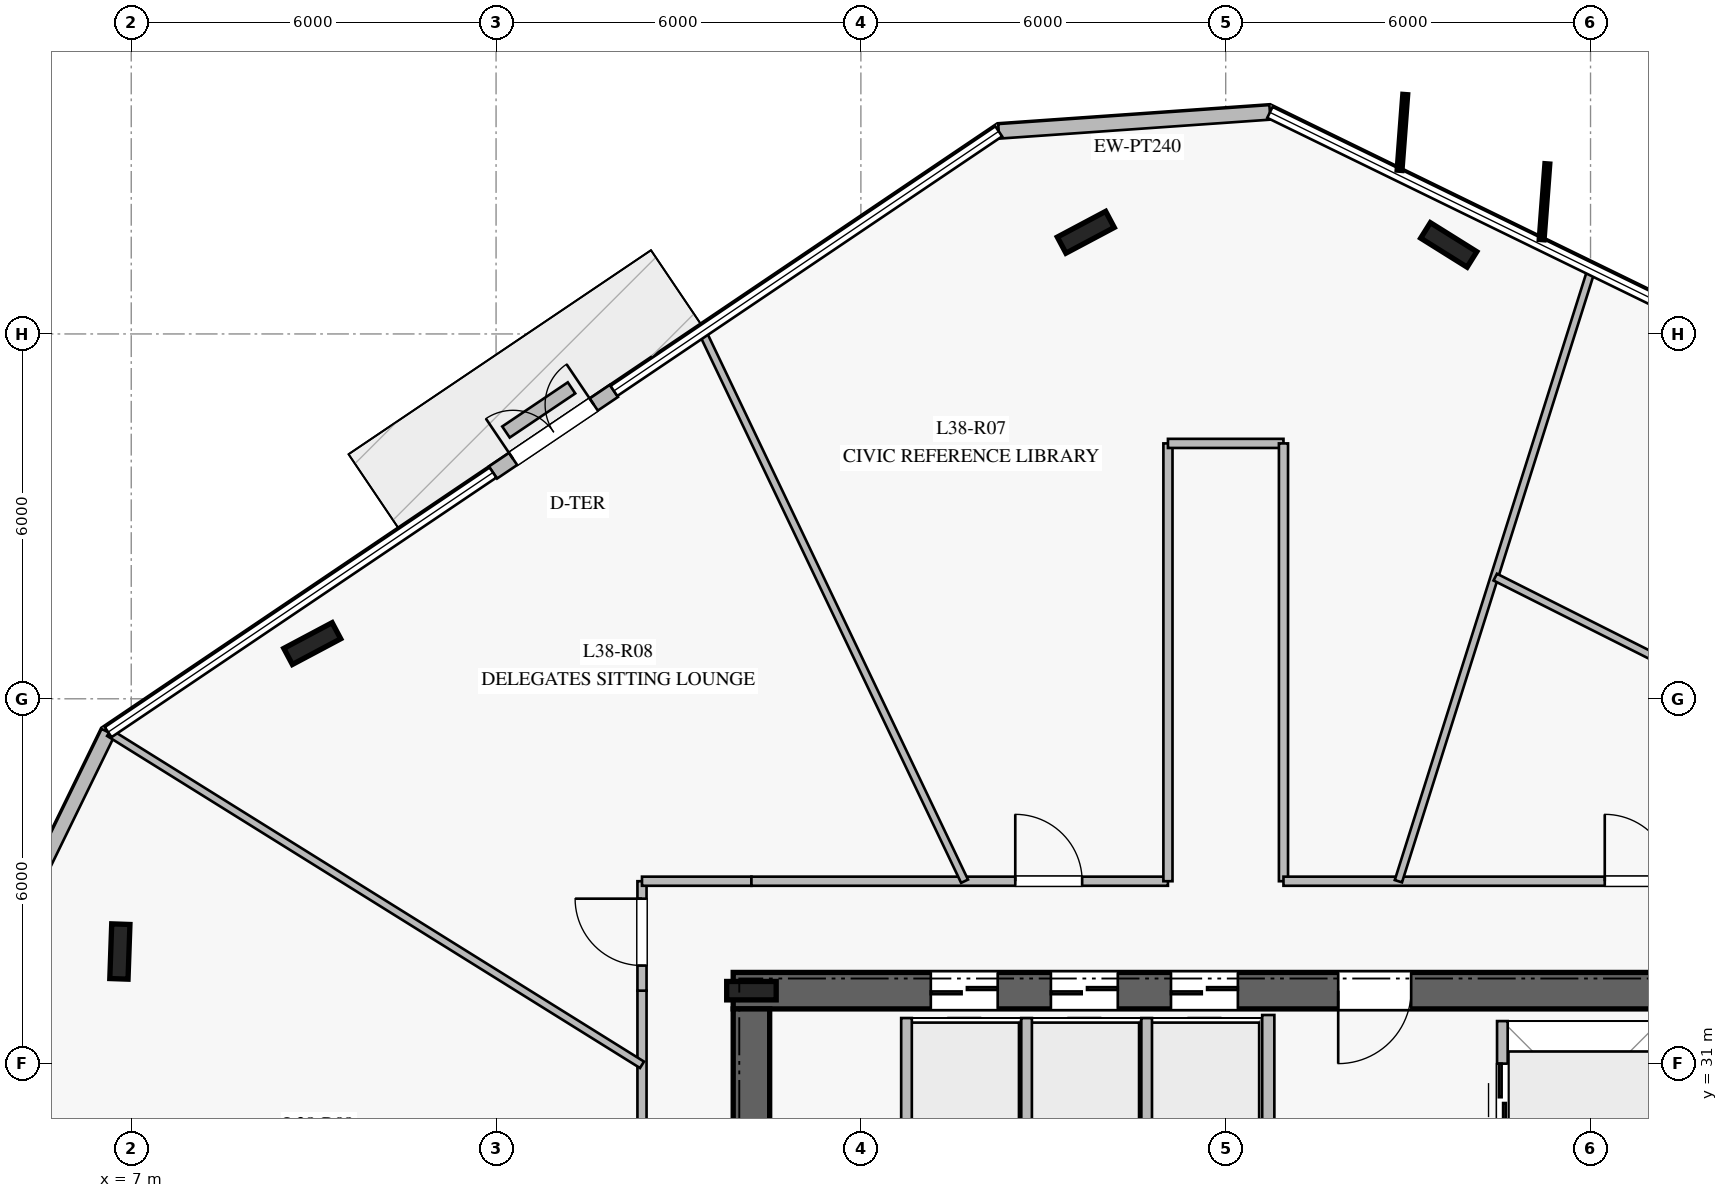
"""IFC4 building model, lengths in metres.
Left out: names, types, materials, properties, quantities, classifications, styles, units other than length and angle.
Written with IfcOpenShell. Run it as: python <this file> out.ifc"""

import sys

from ifc_helpers import new_model, si_unit, direction, frame, frame_2d, origin, origin_2d, place, context, subcontext, project, spatial, rectangle, i_section, extrude, element, fill, save


model = new_model("IFC4")
c1 = context("Model", 3, precision=1e-05, world=origin(), true_north=direction((0.0, 1.0)))
c2 = subcontext(c1, "Body", "Model", "MODEL_VIEW")
j1 = project(units=[si_unit("LENGTHUNIT", "METRE"), si_unit("PLANEANGLEUNIT", "RADIAN")], contexts=[c1])
p1 = place(None, origin())
s1 = spatial("IfcSite", under=j1, at=p1, CompositionType="ELEMENT")
p2 = place(p1, origin())
s2 = spatial("IfcBuilding", under=s1, at=p2, CompositionType="ELEMENT")
p3 = place(p2, frame((0.0, 0.0, 158.4)))
s3 = spatial("IfcBuildingStorey", under=s2, at=p3, CompositionType="ELEMENT", Elevation=158.4)
p4 = place(p3, frame((33.1, 32.2, 0.0), z_axis=(0.0, 0.0, 1.0), x_axis=(-1.0, 0.0, 0.0)))
e1 = element("IfcWall", 1, at=p4, inside=s3, PredefinedType="SHEAR", context=c2, shape_type="SweptSolid", body=[
    extrude(rectangle(XDim=16.2, YDim=0.6, at=frame_2d((8.1, 0.0))), origin(), (0.0, 0.0, 1.0), 3.76),
])
p5 = place(p4, frame((5.05, 0.0, 0.0)))
e2 = element("IfcOpeningElement", 2, at=p5, cuts=e1, PredefinedType="OPENING", context=c2, shape_type="SweptSolid", body=[
    extrude(rectangle(XDim=1.2, YDim=2.25, at=frame_2d((0.6, 1.125))), frame((0.0, 0.31, 0.0), z_axis=(0.0, -1.0, 0.0), x_axis=(1.0, 0.0, 0.0)), (0.0, 0.0, 1.0), 0.62),
])
p6 = place(p4, frame((11.85, 0.0, 0.0)))
e3 = element("IfcOpeningElement", 3, at=p6, cuts=e1, PredefinedType="OPENING", context=c2, shape_type="SweptSolid", body=[
    extrude(rectangle(XDim=1.1, YDim=2.2, at=frame_2d((0.55, 1.1))), frame((0.0, 0.31, 0.0), z_axis=(0.0, -1.0, 0.0), x_axis=(1.0, 0.0, 0.0)), (0.0, 0.0, 1.0), 0.62),
])
p7 = place(p4, frame((9.875, 0.0, 0.0)))
e4 = element("IfcOpeningElement", 4, at=p7, cuts=e1, PredefinedType="OPENING", context=c2, shape_type="SweptSolid", body=[
    extrude(rectangle(XDim=1.1, YDim=2.2, at=frame_2d((0.55, 1.1))), frame((0.0, 0.31, 0.0), z_axis=(0.0, -1.0, 0.0), x_axis=(1.0, 0.0, 0.0)), (0.0, 0.0, 1.0), 0.62),
])
p8 = place(p4, frame((7.9, 0.0, 0.0)))
e5 = element("IfcOpeningElement", 5, at=p8, cuts=e1, PredefinedType="OPENING", context=c2, shape_type="SweptSolid", body=[
    extrude(rectangle(XDim=1.1, YDim=2.2, at=frame_2d((0.55, 1.1))), frame((0.0, 0.31, 0.0), z_axis=(0.0, -1.0, 0.0), x_axis=(1.0, 0.0, 0.0)), (0.0, 0.0, 1.0), 0.62),
])
p9 = place(p3, frame((17.2, 31.9, 0.0), z_axis=(0.0, 0.0, 1.0), x_axis=(0.0, -1.0, 0.0)))
e6 = element("IfcWall", 6, at=p9, inside=s3, PredefinedType="SHEAR", context=c2, shape_type="SweptSolid", body=[
    extrude(rectangle(XDim=13.8, YDim=0.6, at=frame_2d((6.9, 0.0))), origin(), (0.0, 0.0, 1.0), 3.76),
])
p10 = place(p9, frame((2.05, 0.0, 0.0)))
e7 = element("IfcOpeningElement", 7, at=p10, cuts=e6, PredefinedType="OPENING", context=c2, shape_type="SweptSolid", body=[
    extrude(rectangle(XDim=1.5, YDim=2.2, at=frame_2d((0.75, 1.1))), frame((0.0, 0.31, 0.0), z_axis=(0.0, -1.0, 0.0), x_axis=(1.0, 0.0, 0.0)), (0.0, 0.0, 1.0), 0.62),
])
p11 = place(p3, frame((17.2, 32.2, 0.0), z_axis=(0.0, 0.0, 1.0), x_axis=(1.0, 0.0, 0.0)))
e8 = element("IfcColumn", 8, at=p11, inside=s3, PredefinedType="COLUMN", context=c2, shape_type="SweptSolid", body=[
    extrude(i_section(OverallWidth=0.303, OverallDepth=0.814, WebThickness=0.021, FlangeThickness=0.04, at=origin_2d()), origin(), (0.0, 0.0, 1.0), 4.0),
])
for number, where, z_axis, x_axis in (
    (9, (28.668, 44.464, 0.0), (0.0, 0.0, 1.0), (-0.848, 0.53, 0.0)),
    (10, (22.699, 44.672, 0.0), (0.0, 0.0, 1.0), (0.883, 0.469, 0.0)),
    (11, (9.977, 37.908, 0.0), (0.0, 0.0, 1.0), (0.883, 0.469, 0.0)),
    (12, (6.813, 32.844, 0.0), (0.0, 0.0, 1.0), (0.035, 0.999, 0.0)),
):
    element("IfcColumn", number, at=place(p3, frame(where, z_axis=z_axis, x_axis=x_axis)), inside=s3, PredefinedType="COLUMN", context=c2, shape_type="SweptSolid", body=[
        extrude(i_section(OverallWidth=0.3, OverallDepth=0.9, WebThickness=0.019, FlangeThickness=0.035, at=origin_2d()), origin(), (0.0, 0.0, 1.0), 4.0),
    ])
p12 = place(p3, frame((25.727, 46.644, 0.0), z_axis=(0.0, 0.0, 1.0), x_axis=(-0.997561857217, -0.069787828636, 0.0)))
e13 = element("IfcWall", 13, at=p12, inside=s3, PredefinedType="STANDARD", context=c2, shape_type="SweptSolid", body=[
    extrude(rectangle(XDim=4.471, YDim=0.24, at=frame_2d((2.235, 0.0))), origin(), (0.0, 0.0, 1.0), 3.76),
])
p13 = place(p3, frame((14.938, 42.063, 0.0), z_axis=(0.0, 0.0, 1.0), x_axis=(-0.828953641959, -0.559317315558, 0.0)))
e14 = element("IfcWall", 14, at=p13, inside=s3, PredefinedType="STANDARD", context=c2, shape_type="SweptSolid", body=[
    extrude(rectangle(XDim=2.399, YDim=0.24, at=frame_2d((1.2, 0.0))), origin(), (0.0, 0.0, 1.0), 3.76),
])
p14 = place(p13, frame((0.4, 0.0, 0.0)))
e15 = element("IfcOpeningElement", 15, at=p14, cuts=e14, PredefinedType="OPENING", context=c2, shape_type="SweptSolid", body=[
    extrude(rectangle(XDim=1.6, YDim=2.25, at=frame_2d((0.8, 1.125))), frame((0.0, 0.13, 0.0), z_axis=(0.0, -1.0, 0.0), x_axis=(1.0, 0.0, 0.0)), (0.0, 0.0, 1.0), 0.26),
])
p15 = place(p3, frame((6.62, 36.452, 0.0), z_axis=(0.0, 0.0, 1.0), x_axis=(-0.438566687479, -0.898698648399, 0.0)))
e16 = element("IfcWall", 16, at=p15, inside=s3, PredefinedType="STANDARD", context=c2, shape_type="SweptSolid", body=[
    extrude(rectangle(XDim=4.472, YDim=0.24, at=frame_2d((2.236, 0.0))), origin(), (0.0, 0.0, 1.0), 3.76),
])
p16 = place(p3, frame((14.241, 42.113, 0.0), z_axis=(0.0, 0.0, 1.0), x_axis=(-0.82938185828, -0.558682139643, 0.0)))
e17 = element("IfcWall", 17, at=p16, inside=s3, PredefinedType="USERDEFINED", context=c2, shape_type="SweptSolid", body=[
    extrude(rectangle(XDim=1.3, YDim=0.22, at=frame_2d((0.65, 0.0))), origin(), (0.0, 0.0, 1.0), 0.4),
])
p17 = place(p3, frame((25.7, 26.65, 0.0), z_axis=(0.0, 0.0, 1.0), x_axis=(0.0, 1.0, 0.0)))
e18 = element("IfcWall", 18, at=p17, inside=s3, PredefinedType="PARTITIONING", context=c2, shape_type="SweptSolid", body=[
    extrude(rectangle(XDim=5.15, YDim=0.2, at=frame_2d((2.575, 0.0))), origin(), (0.0, 0.0, 1.0), 3.76),
])
for number, where, z_axis, x_axis in (
    (19, (19.75, 29.4, 0.0), (0.0, 0.0, 1.0), (0.0, 1.0, 0.0)),
    (20, (21.725, 29.4, 0.0), (0.0, 0.0, 1.0), (0.0, 1.0, 0.0)),
    (21, (23.7, 29.4, 0.0), (0.0, 0.0, 1.0), (0.0, 1.0, 0.0)),
):
    element("IfcWall", number, at=place(p3, frame(where, z_axis=z_axis, x_axis=x_axis)), inside=s3, PredefinedType="PARTITIONING", context=c2, shape_type="SweptSolid", body=[
        extrude(rectangle(XDim=2.35, YDim=0.175, at=frame_2d((1.175, 0.0))), origin(), (0.0, 0.0, 1.0), 3.76),
    ])
p18 = place(p3, frame((29.55, 29.1, 0.0), z_axis=(0.0, 0.0, 1.0), x_axis=(0.0, 1.0, 0.0)))
e22 = element("IfcWall", 22, at=p18, inside=s3, PredefinedType="PARTITIONING", context=c2, shape_type="SweptSolid", body=[
    extrude(rectangle(XDim=2.6, YDim=0.175, at=frame_2d((1.3, 0.0))), origin(), (0.0, 0.0, 1.0), 3.76),
])
p19 = place(p18, frame((0.7, 0.0, 0.0)))
e23 = element("IfcOpeningElement", 23, at=p19, cuts=e22, PredefinedType="OPENING", context=c2, shape_type="SweptSolid", body=[
    extrude(rectangle(XDim=1.2, YDim=2.2, at=frame_2d((0.6, 1.1))), frame((0.0, 0.098, 0.0), z_axis=(0.0, -1.0, 0.0), x_axis=(1.0, 0.0, 0.0)), (0.0, 0.0, 1.0), 0.195),
])
p20 = place(p3, frame((15.4, 25.95, 0.0), z_axis=(0.0, 0.0, 1.0), x_axis=(0.0, 1.0, 0.0)))
e24 = element("IfcWall", 24, at=p20, inside=s3, PredefinedType="PARTITIONING", context=c2, shape_type="SweptSolid", body=[
    extrude(rectangle(XDim=6.25, YDim=0.15, at=frame_2d((3.125, 0.0))), origin(), (0.0, 0.0, 1.0), 3.21),
])
p21 = place(p3, frame((15.4, 32.2, 0.0), z_axis=(0.0, 0.0, 1.0), x_axis=(0.0, 1.0, 0.0)))
e25 = element("IfcWall", 25, at=p21, inside=s3, PredefinedType="PARTITIONING", context=c2, shape_type="SweptSolid", body=[
    extrude(rectangle(XDim=1.8, YDim=0.15, at=frame_2d((0.9, 0.0))), origin(), (0.0, 0.0, 1.0), 3.21),
])
p22 = place(p21, frame((0.413, 0.0, 0.0)))
e26 = element("IfcOpeningElement", 26, at=p22, cuts=e25, PredefinedType="OPENING", context=c2, shape_type="SweptSolid", body=[
    extrude(rectangle(XDim=1.1, YDim=2.2, at=frame_2d((0.55, 1.1))), frame((0.0, 0.085, 0.0), z_axis=(0.0, -1.0, 0.0), x_axis=(1.0, 0.0, 0.0)), (0.0, 0.0, 1.0), 0.17),
])
p23 = place(p3, frame((15.4, 34.0, 0.0), z_axis=(0.0, 0.0, 1.0), x_axis=(1.0, 0.0, 0.0)))
e27 = element("IfcWall", 27, at=p23, inside=s3, PredefinedType="PARTITIONING", context=c2, shape_type="SweptSolid", body=[
    extrude(rectangle(XDim=1.8, YDim=0.15, at=frame_2d((0.9, 0.0))), origin(), (0.0, 0.0, 1.0), 3.76),
])
p24 = place(p3, frame((17.2, 34.0, 0.0), z_axis=(0.0, 0.0, 1.0), x_axis=(1.0, 0.0, 0.0)))
e28 = element("IfcWall", 28, at=p24, inside=s3, PredefinedType="PARTITIONING", context=c2, shape_type="SweptSolid", body=[
    extrude(rectangle(XDim=6.85, YDim=0.15, at=frame_2d((3.425, 0.0))), origin(), (0.0, 0.0, 1.0), 3.21),
])
p25 = place(p24, frame((4.339, 0.0, 0.0)))
e29 = element("IfcOpeningElement", 29, at=p25, cuts=e28, PredefinedType="OPENING", context=c2, shape_type="SweptSolid", body=[
    extrude(rectangle(XDim=1.1, YDim=2.2, at=frame_2d((0.55, 1.1))), frame((0.0, 0.085, 0.0), z_axis=(0.0, -1.0, 0.0), x_axis=(1.0, 0.0, 0.0)), (0.0, 0.0, 1.0), 0.17),
])
p26 = place(p3, frame((24.05, 34.0, 0.0), z_axis=(0.0, 0.0, 1.0), x_axis=(0.0, 1.0, 0.0)))
e30 = element("IfcWall", 30, at=p26, inside=s3, PredefinedType="PARTITIONING", context=c2, shape_type="SweptSolid", body=[
    extrude(rectangle(XDim=7.2, YDim=0.15, at=frame_2d((3.6, 0.0))), origin(), (0.0, 0.0, 1.0), 3.36),
])
p27 = place(p3, frame((24.05, 41.2, 0.0), z_axis=(0.0, 0.0, 1.0), x_axis=(1.0, 0.0, 0.0)))
e31 = element("IfcWall", 31, at=p27, inside=s3, PredefinedType="PARTITIONING", context=c2, shape_type="SweptSolid", body=[
    extrude(rectangle(XDim=1.9, YDim=0.15, at=frame_2d((0.95, 0.0))), origin(), (0.0, 0.0, 1.0), 3.76),
])
p28 = place(p3, frame((25.95, 41.2, 0.0), z_axis=(0.0, 0.0, 1.0), x_axis=(0.0, -1.0, 0.0)))
e32 = element("IfcWall", 32, at=p28, inside=s3, PredefinedType="PARTITIONING", context=c2, shape_type="SweptSolid", body=[
    extrude(rectangle(XDim=7.2, YDim=0.15, at=frame_2d((3.6, 0.0))), origin(), (0.0, 0.0, 1.0), 3.36),
])
p29 = place(p3, frame((25.95, 34.0, 0.0), z_axis=(0.0, 0.0, 1.0), x_axis=(1.0, 0.0, 0.0)))
e33 = element("IfcWall", 33, at=p29, inside=s3, PredefinedType="PARTITIONING", context=c2, shape_type="SweptSolid", body=[
    extrude(rectangle(XDim=15.25, YDim=0.15, at=frame_2d((7.625, 0.0))), origin(), (0.0, 0.0, 1.0), 3.21),
])
p30 = place(p29, frame((11.851, 0.0, 0.0)))
e34 = element("IfcOpeningElement", 34, at=p30, cuts=e33, PredefinedType="OPENING", context=c2, shape_type="SweptSolid", body=[
    extrude(rectangle(XDim=1.1, YDim=2.2, at=frame_2d((0.55, 1.1))), frame((0.0, 0.085, 0.0), z_axis=(0.0, -1.0, 0.0), x_axis=(1.0, 0.0, 0.0)), (0.0, 0.0, 1.0), 0.17),
])
p31 = place(p29, frame((5.284, 0.0, 0.0)))
e35 = element("IfcOpeningElement", 35, at=p31, cuts=e33, PredefinedType="OPENING", context=c2, shape_type="SweptSolid", body=[
    extrude(rectangle(XDim=1.1, YDim=2.2, at=frame_2d((0.55, 1.1))), frame((0.0, 0.085, 0.0), z_axis=(0.0, -1.0, 0.0), x_axis=(1.0, 0.0, 0.0)), (0.0, 0.0, 1.0), 0.17),
])
p32 = place(p3, frame((27.84, 34.0, 0.0), z_axis=(0.0, 0.0, 1.0), x_axis=(0.300858550785, 0.953668775005, 0.0)))
e36 = element("IfcWall", 36, at=p32, inside=s3, PredefinedType="PARTITIONING", context=c2, shape_type="SweptSolid", body=[
    extrude(rectangle(XDim=10.536, YDim=0.125, at=frame_2d((5.268, 0.0))), origin(), (0.0, 0.0, 1.0), 3.16),
])
p33 = place(p3, frame((20.705, 34.0, 0.0), z_axis=(0.0, 0.0, 1.0), x_axis=(-0.430753986645, 0.902469391719, 0.0)))
e37 = element("IfcWall", 37, at=p33, inside=s3, PredefinedType="PARTITIONING", context=c2, shape_type="SweptSolid", body=[
    extrude(rectangle(XDim=10.001, YDim=0.125, at=frame_2d((5.0, 0.0))), origin(), (0.0, 0.0, 1.0), 3.16),
])
p34 = place(p3, frame((15.4, 30.981, 0.0), z_axis=(0.0, 0.0, 1.0), x_axis=(-0.848716115213, 0.528848707833, 0.0)))
e38 = element("IfcWall", 38, at=p34, inside=s3, PredefinedType="PARTITIONING", context=c2, shape_type="SweptSolid", body=[
    extrude(rectangle(XDim=10.326, YDim=0.125, at=frame_2d((5.163, 0.0))), origin(), (0.0, 0.0, 1.0), 3.16),
])
p35 = place(p3, frame((37.1, 35.145, 0.0), z_axis=(0.0, 0.0, 1.0), x_axis=(-0.893377857621, 0.449306135628, 0.0)))
e39 = element("IfcWall", 39, at=p35, inside=s3, PredefinedType="PARTITIONING", context=c2, shape_type="SweptSolid", body=[
    extrude(rectangle(XDim=8.582, YDim=0.125, at=frame_2d((4.291, 0.0))), origin(), (0.0, 0.0, 1.0), 3.21),
])
p36 = place(p35, frame((3.702, 0.0, 0.0)))
e40 = element("IfcOpeningElement", 40, at=p36, cuts=e39, PredefinedType="OPENING", context=c2, shape_type="SweptSolid", body=[
    extrude(rectangle(XDim=1.0, YDim=2.15, at=frame_2d((0.5, 1.075))), frame((0.0, 0.073, 0.0), z_axis=(0.0, -1.0, 0.0), x_axis=(1.0, 0.0, 0.0)), (0.0, 0.0, 1.0), 0.145),
])
p37 = place(p14, frame((1.6, 0.0, 0.0), z_axis=(0.0, 0.0, 1.0), x_axis=(-1.0, 0.0, 0.0)))
e41 = element("IfcDoor", 41, at=p37, inside=s3, OperationType="DOUBLE_DOOR_SINGLE_SWING", PredefinedType="DOOR", context=c2, shape_type="SweptSolid", body=[
    extrude(rectangle(XDim=1.6, YDim=2.25, at=frame_2d((0.8, 1.125))), frame((0.0, 0.025, 0.0), z_axis=(0.0, -1.0, 0.0), x_axis=(1.0, 0.0, 0.0)), (0.0, 0.0, 1.0), 0.05),
])
fill(e15, e41)
p38 = place(p5, origin())
e42 = element("IfcDoor", 42, at=p38, inside=s3, OperationType="SINGLE_SWING_RIGHT", PredefinedType="DOOR", context=c2, shape_type="SweptSolid", body=[
    extrude(rectangle(XDim=1.2, YDim=2.25, at=frame_2d((0.6, 1.125))), frame((0.0, 0.025, 0.0), z_axis=(0.0, -1.0, 0.0), x_axis=(1.0, 0.0, 0.0)), (0.0, 0.0, 1.0), 0.05),
])
fill(e2, e42)
p39 = place(p6, origin())
e43 = element("IfcDoor", 43, at=p39, inside=s3, OperationType="DOUBLE_DOOR_SLIDING", PredefinedType="DOOR", context=c2, shape_type="SweptSolid", body=[
    extrude(rectangle(XDim=1.1, YDim=2.2, at=frame_2d((0.55, 1.1))), frame((0.0, 0.025, 0.0), z_axis=(0.0, -1.0, 0.0), x_axis=(1.0, 0.0, 0.0)), (0.0, 0.0, 1.0), 0.05),
])
fill(e3, e43)
p40 = place(p7, origin())
e44 = element("IfcDoor", 44, at=p40, inside=s3, OperationType="DOUBLE_DOOR_SLIDING", PredefinedType="DOOR", context=c2, shape_type="SweptSolid", body=[
    extrude(rectangle(XDim=1.1, YDim=2.2, at=frame_2d((0.55, 1.1))), frame((0.0, 0.025, 0.0), z_axis=(0.0, -1.0, 0.0), x_axis=(1.0, 0.0, 0.0)), (0.0, 0.0, 1.0), 0.05),
])
fill(e4, e44)
p41 = place(p8, origin())
e45 = element("IfcDoor", 45, at=p41, inside=s3, OperationType="DOUBLE_DOOR_SLIDING", PredefinedType="DOOR", context=c2, shape_type="SweptSolid", body=[
    extrude(rectangle(XDim=1.1, YDim=2.2, at=frame_2d((0.55, 1.1))), frame((0.0, 0.025, 0.0), z_axis=(0.0, -1.0, 0.0), x_axis=(1.0, 0.0, 0.0)), (0.0, 0.0, 1.0), 0.05),
])
fill(e5, e45)
p42 = place(p19, origin())
e46 = element("IfcDoor", 46, at=p42, inside=s3, OperationType="DOUBLE_DOOR_SLIDING", PredefinedType="DOOR", context=c2, shape_type="SweptSolid", body=[
    extrude(rectangle(XDim=1.2, YDim=2.2, at=frame_2d((0.6, 1.1))), frame((0.0, 0.025, 0.0), z_axis=(0.0, -1.0, 0.0), x_axis=(1.0, 0.0, 0.0)), (0.0, 0.0, 1.0), 0.05),
])
fill(e23, e46)
p43 = place(p31, origin())
e47 = element("IfcDoor", 47, at=p43, inside=s3, OperationType="SINGLE_SWING_LEFT", PredefinedType="DOOR", context=c2, shape_type="SweptSolid", body=[
    extrude(rectangle(XDim=1.1, YDim=2.2, at=frame_2d((0.55, 1.1))), frame((0.0, 0.025, 0.0), z_axis=(0.0, -1.0, 0.0), x_axis=(1.0, 0.0, 0.0)), (0.0, 0.0, 1.0), 0.05),
])
fill(e35, e47)
p44 = place(p25, origin())
e48 = element("IfcDoor", 48, at=p44, inside=s3, OperationType="SINGLE_SWING_LEFT", PredefinedType="DOOR", context=c2, shape_type="SweptSolid", body=[
    extrude(rectangle(XDim=1.1, YDim=2.2, at=frame_2d((0.55, 1.1))), frame((0.0, 0.025, 0.0), z_axis=(0.0, -1.0, 0.0), x_axis=(1.0, 0.0, 0.0)), (0.0, 0.0, 1.0), 0.05),
])
fill(e29, e48)
p45 = place(p22, origin())
e49 = element("IfcDoor", 49, at=p45, inside=s3, OperationType="SINGLE_SWING_RIGHT", PredefinedType="DOOR", context=c2, shape_type="SweptSolid", body=[
    extrude(rectangle(XDim=1.1, YDim=2.2, at=frame_2d((0.55, 1.1))), frame((0.0, 0.025, 0.0), z_axis=(0.0, -1.0, 0.0), x_axis=(1.0, 0.0, 0.0)), (0.0, 0.0, 1.0), 0.05),
])
fill(e26, e49)
save(model, sys.argv[1])
